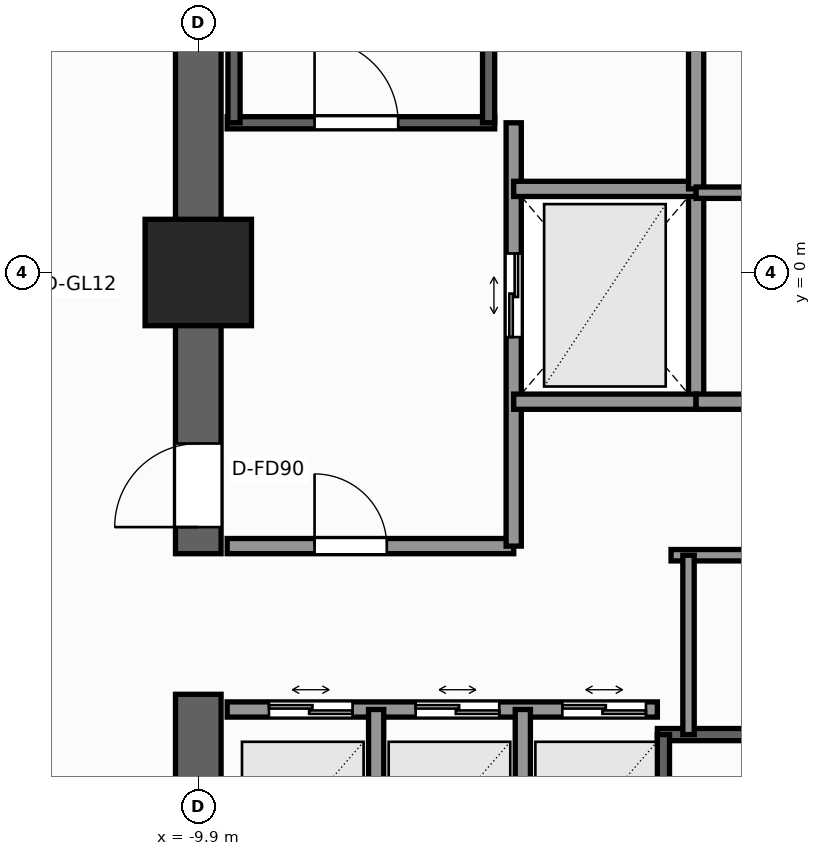
"""IFC4 building model, lengths in metres.
Left out: names, types, materials, properties, quantities, classifications, styles, units other than length and angle.
Written with IfcOpenShell. Run it as: python <this file> out.ifc"""

import sys

from ifc_helpers import new_model, si_unit, direction, frame, frame_2d, origin, origin_2d, place, context, subcontext, project, spatial, rectangle, extrude, element, fill, save


model = new_model("IFC4")
c1 = context("Model", 3, precision=1e-05, world=origin(), true_north=direction((0.0, 1.0)))
c2 = subcontext(c1, "Body", "Model", "MODEL_VIEW")
j1 = project(units=[si_unit("LENGTHUNIT", "METRE"), si_unit("PLANEANGLEUNIT", "RADIAN")], contexts=[c1])
p1 = place(None, origin())
s1 = spatial("IfcSite", under=j1, at=p1, CompositionType="ELEMENT")
p2 = place(p1, origin())
s2 = spatial("IfcBuilding", under=s1, at=p2, CompositionType="ELEMENT")
p3 = place(p2, frame((0.0, 0.0, 68.0)))
s3 = spatial("IfcBuildingStorey", under=s2, at=p3, CompositionType="ELEMENT", Elevation=68.0)
p4 = place(p3, frame((-9.9, -9.6, 0.0), z_axis=(0.0, 0.0, 1.0), x_axis=(0.0, 1.0, 0.0)))
e1 = element("IfcWall", 1, at=p4, inside=s3, PredefinedType="SHEAR", context=c2, shape_type="SweptSolid", body=[
    extrude(rectangle(XDim=4.05, YDim=0.6, at=frame_2d((2.025, 0.0))), origin(), (0.0, 0.0, 1.0), 4.2),
])
p5 = place(p3, frame((-9.9, -3.7, 0.0), z_axis=(0.0, 0.0, 1.0), x_axis=(0.0, 1.0, 0.0)))
e2 = element("IfcWall", 2, at=p5, inside=s3, PredefinedType="SHEAR", context=c2, shape_type="SweptSolid", body=[
    extrude(rectangle(XDim=13.3, YDim=0.6, at=frame_2d((6.65, 0.0))), origin(), (0.0, 0.0, 1.0), 4.2),
])
p6 = place(p5, frame((0.35, 0.0, 0.0)))
e3 = element("IfcOpeningElement", 3, at=p6, cuts=e2, PredefinedType="OPENING", context=c2, shape_type="SweptSolid", body=[
    extrude(rectangle(XDim=1.1, YDim=2.2, at=frame_2d((0.55, 1.1))), frame((0.0, 0.31, 0.0), z_axis=(0.0, -1.0, 0.0), x_axis=(1.0, 0.0, 0.0)), (0.0, 0.0, 1.0), 0.62),
])
p7 = place(p3, frame((-9.9, 0.0, 0.0), z_axis=(0.0, 0.0, 1.0), x_axis=(1.0, 0.0, 0.0)))
e4 = element("IfcColumn", 4, at=p7, inside=s3, PredefinedType="COLUMN", context=c2, shape_type="SweptSolid", body=[
    extrude(rectangle(XDim=1.4, YDim=1.4, at=origin_2d()), origin(), (0.0, 0.0, 1.0), 4.2),
])
p8 = place(p3, frame((-9.52, 1.97, 0.0), z_axis=(0.0, 0.0, 1.0), x_axis=(1.0, 0.0, 0.0)))
e5 = element("IfcWall", 5, at=p8, inside=s3, PredefinedType="SHEAR", context=c2, shape_type="SweptSolid", body=[
    extrude(rectangle(XDim=3.52, YDim=0.16, at=frame_2d((1.76, 0.0))), origin(), (0.0, 0.0, 1.0), 4.2),
])
p9 = place(p8, frame((1.15, 0.0, 0.0)))
e6 = element("IfcOpeningElement", 6, at=p9, cuts=e5, PredefinedType="OPENING", context=c2, shape_type="SweptSolid", body=[
    extrude(rectangle(XDim=1.1, YDim=2.2, at=frame_2d((0.55, 1.1))), frame((0.0, 0.09, 0.0), z_axis=(0.0, -1.0, 0.0), x_axis=(1.0, 0.0, 0.0)), (0.0, 0.0, 1.0), 0.18),
])
for number, where, z_axis, x_axis in (
    (7, (-9.43, 1.97, 0.0), (0.0, 0.0, 1.0), (0.0, 1.0, 0.0)),
    (8, (-6.08, 1.97, 0.0), (0.0, 0.0, 1.0), (0.0, 1.0, 0.0)),
):
    element("IfcWall", number, at=place(p3, frame(where, z_axis=z_axis, x_axis=x_axis)), inside=s3, PredefinedType="SHEAR", context=c2, shape_type="SweptSolid", body=[
        extrude(rectangle(XDim=7.56, YDim=0.16, at=frame_2d((3.78, 0.0))), origin(), (0.0, 0.0, 1.0), 4.2),
    ])
p10 = place(p3, frame((-3.86, -6.08, 0.0), z_axis=(0.0, 0.0, 1.0), x_axis=(1.0, 0.0, 0.0)))
e9 = element("IfcWall", 9, at=p10, inside=s3, PredefinedType="SHEAR", context=c2, shape_type="SweptSolid", body=[
    extrude(rectangle(XDim=7.72, YDim=0.16, at=frame_2d((3.86, 0.0))), origin(), (0.0, 0.0, 1.0), 4.2),
])
p11 = place(p3, frame((-3.78, -9.43, 0.0), z_axis=(0.0, 0.0, 1.0), x_axis=(0.0, 1.0, 0.0)))
e10 = element("IfcWall", 10, at=p11, inside=s3, PredefinedType="SHEAR", context=c2, shape_type="SweptSolid", body=[
    extrude(rectangle(XDim=3.35, YDim=0.16, at=frame_2d((1.675, 0.0))), origin(), (0.0, 0.0, 1.0), 4.2),
])
p12 = place(p3, frame((-9.52, -3.6, 0.0), z_axis=(0.0, 0.0, 1.0), x_axis=(1.0, 0.0, 0.0)))
e11 = element("IfcWall", 11, at=p12, inside=s3, PredefinedType="SOLIDWALL", context=c2, shape_type="SweptSolid", body=[
    extrude(rectangle(XDim=3.77, YDim=0.2, at=frame_2d((1.885, 0.0))), origin(), (0.0, 0.0, 1.0), 3.98),
])
p13 = place(p12, frame((1.15, 0.0, 0.0)))
e12 = element("IfcOpeningElement", 12, at=p13, cuts=e11, PredefinedType="OPENING", context=c2, shape_type="SweptSolid", body=[
    extrude(rectangle(XDim=0.95, YDim=2.06, at=frame_2d((0.475, 1.03))), frame((0.0, 0.11, 0.0), z_axis=(0.0, -1.0, 0.0), x_axis=(1.0, 0.0, 0.0)), (0.0, 0.0, 1.0), 0.22),
])
p14 = place(p3, frame((-5.75, -3.6, 0.0), z_axis=(0.0, 0.0, 1.0), x_axis=(0.0, 1.0, 0.0)))
e13 = element("IfcWall", 13, at=p14, inside=s3, PredefinedType="SOLIDWALL", context=c2, shape_type="SweptSolid", body=[
    extrude(rectangle(XDim=5.57, YDim=0.2, at=frame_2d((2.785, 0.0))), origin(), (0.0, 0.0, 1.0), 3.98),
])
p15 = place(p14, frame((2.75, 0.0, 0.0)))
e14 = element("IfcOpeningElement", 14, at=p15, cuts=e13, PredefinedType="OPENING", context=c2, shape_type="SweptSolid", body=[
    extrude(rectangle(XDim=1.1, YDim=2.2, at=frame_2d((0.55, 1.1))), frame((0.0, 0.11, 0.0), z_axis=(0.0, -1.0, 0.0), x_axis=(1.0, 0.0, 0.0)), (0.0, 0.0, 1.0), 0.22),
])
p16 = place(p3, frame((-3.35, -1.7, 0.0), z_axis=(0.0, 0.0, 1.0), x_axis=(0.0, 1.0, 0.0)))
e15 = element("IfcWall", 15, at=p16, inside=s3, PredefinedType="SOLIDWALL", context=c2, shape_type="SweptSolid", body=[
    extrude(rectangle(XDim=2.8, YDim=0.2, at=frame_2d((1.4, 0.0))), origin(), (0.0, 0.0, 1.0), 3.98),
])
for number, where, z_axis, x_axis in (
    (16, (-5.75, -1.7, 0.0), (0.0, 0.0, 1.0), (1.0, 0.0, 0.0)),
    (17, (-5.75, 1.1, 0.0), (0.0, 0.0, 1.0), (1.0, 0.0, 0.0)),
):
    element("IfcWall", number, at=place(p3, frame(where, z_axis=z_axis, x_axis=x_axis)), inside=s3, PredefinedType="SOLIDWALL", context=c2, shape_type="SweptSolid", body=[
        extrude(rectangle(XDim=2.4, YDim=0.2, at=frame_2d((1.2, 0.0))), origin(), (0.0, 0.0, 1.0), 3.98),
    ])
p17 = place(p3, frame((-9.52, -5.75, 0.0), z_axis=(0.0, 0.0, 1.0), x_axis=(1.0, 0.0, 0.0)))
e18 = element("IfcWall", 18, at=p17, inside=s3, PredefinedType="SOLIDWALL", context=c2, shape_type="SweptSolid", body=[
    extrude(rectangle(XDim=5.66, YDim=0.2, at=frame_2d((2.83, 0.0))), origin(), (0.0, 0.0, 1.0), 3.98),
])
p18 = place(p17, frame((0.55, 0.0, 0.0)))
e19 = element("IfcOpeningElement", 19, at=p18, cuts=e18, PredefinedType="OPENING", context=c2, shape_type="SweptSolid", body=[
    extrude(rectangle(XDim=1.1, YDim=2.2, at=frame_2d((0.55, 1.1))), frame((0.0, 0.11, 0.0), z_axis=(0.0, -1.0, 0.0), x_axis=(1.0, 0.0, 0.0)), (0.0, 0.0, 1.0), 0.22),
])
p19 = place(p17, frame((2.48, 0.0, 0.0)))
e20 = element("IfcOpeningElement", 20, at=p19, cuts=e18, PredefinedType="OPENING", context=c2, shape_type="SweptSolid", body=[
    extrude(rectangle(XDim=1.1, YDim=2.2, at=frame_2d((0.55, 1.1))), frame((0.0, 0.11, 0.0), z_axis=(0.0, -1.0, 0.0), x_axis=(1.0, 0.0, 0.0)), (0.0, 0.0, 1.0), 0.22),
])
p20 = place(p17, frame((4.41, 0.0, 0.0)))
e21 = element("IfcOpeningElement", 21, at=p20, cuts=e18, PredefinedType="OPENING", context=c2, shape_type="SweptSolid", body=[
    extrude(rectangle(XDim=1.1, YDim=2.2, at=frame_2d((0.55, 1.1))), frame((0.0, 0.11, 0.0), z_axis=(0.0, -1.0, 0.0), x_axis=(1.0, 0.0, 0.0)), (0.0, 0.0, 1.0), 0.22),
])
for number, where, z_axis, x_axis in (
    (22, (-7.56, -9.52, 0.0), (0.0, 0.0, 1.0), (0.0, 1.0, 0.0)),
    (23, (-5.63, -9.52, 0.0), (0.0, 0.0, 1.0), (0.0, 1.0, 0.0)),
):
    element("IfcWall", number, at=place(p3, frame(where, z_axis=z_axis, x_axis=x_axis)), inside=s3, PredefinedType="SOLIDWALL", context=c2, shape_type="SweptSolid", body=[
        extrude(rectangle(XDim=3.77, YDim=0.2, at=frame_2d((1.885, 0.0))), origin(), (0.0, 0.0, 1.0), 3.98),
    ])
p21 = place(p3, frame((-3.35, -1.7, 0.0), z_axis=(0.0, 0.0, 1.0), x_axis=(1.0, 0.0, 0.0)))
e24 = element("IfcWall", 24, at=p21, inside=s3, PredefinedType="SOLIDWALL", context=c2, shape_type="SweptSolid", body=[
    extrude(rectangle(XDim=6.7, YDim=0.2, at=frame_2d((3.35, 0.0))), origin(), (0.0, 0.0, 1.0), 3.98),
])
p22 = place(p3, frame((-3.35, 1.1, 0.0), z_axis=(0.0, 0.0, 1.0), x_axis=(0.0, 1.0, 0.0)))
e25 = element("IfcWall", 25, at=p22, inside=s3, PredefinedType="SOLIDWALL", context=c2, shape_type="SweptSolid", body=[
    extrude(rectangle(XDim=3.2, YDim=0.2, at=frame_2d((1.6, 0.0))), origin(), (0.0, 0.0, 1.0), 3.98),
])
p23 = place(p3, frame((-3.35, 1.05, 0.0), z_axis=(0.0, 0.0, 1.0), x_axis=(1.0, 0.0, 0.0)))
e26 = element("IfcWall", 26, at=p23, inside=s3, PredefinedType="PARTITIONING", context=c2, shape_type="SweptSolid", body=[
    extrude(rectangle(XDim=6.7, YDim=0.15, at=frame_2d((3.35, 0.0))), origin(), (0.0, 0.0, 1.0), 3.98),
])
p24 = place(p23, frame((4.2, 0.0, 0.0)))
e27 = element("IfcOpeningElement", 27, at=p24, cuts=e26, PredefinedType="OPENING", context=c2, shape_type="SweptSolid", body=[
    extrude(rectangle(XDim=0.85, YDim=2.03, at=frame_2d((0.425, 1.015))), frame((0.0, 0.085, 0.0), z_axis=(0.0, -1.0, 0.0), x_axis=(1.0, 0.0, 0.0)), (0.0, 0.0, 1.0), 0.17),
])
p25 = place(p3, frame((-3.68, -3.72, 0.0), z_axis=(0.0, 0.0, 1.0), x_axis=(1.0, 0.0, 0.0)))
e28 = element("IfcWall", 28, at=p25, inside=s3, PredefinedType="PARTITIONING", context=c2, shape_type="SweptSolid", body=[
    extrude(rectangle(XDim=7.36, YDim=0.15, at=frame_2d((3.68, 0.0))), origin(), (0.0, 0.0, 1.0), 3.98),
])
p26 = place(p3, frame((-3.45, -6.08, 0.0), z_axis=(0.0, 0.0, 1.0), x_axis=(0.0, 1.0, 0.0)))
e29 = element("IfcWall", 29, at=p26, inside=s3, PredefinedType="PARTITIONING", context=c2, shape_type="SweptSolid", body=[
    extrude(rectangle(XDim=2.36, YDim=0.15, at=frame_2d((1.18, 0.0))), origin(), (0.0, 0.0, 1.0), 3.98),
])
p27 = place(p9, origin())
e30 = element("IfcDoor", 30, at=p27, inside=s3, OperationType="SINGLE_SWING_LEFT", PredefinedType="DOOR", context=c2, shape_type="SweptSolid", body=[
    extrude(rectangle(XDim=1.1, YDim=2.2, at=frame_2d((0.55, 1.1))), frame((0.0, 0.025, 0.0), z_axis=(0.0, -1.0, 0.0), x_axis=(1.0, 0.0, 0.0)), (0.0, 0.0, 1.0), 0.05),
])
fill(e6, e30)
p28 = place(p6, origin())
e31 = element("IfcDoor", 31, at=p28, inside=s3, OperationType="SINGLE_SWING_LEFT", PredefinedType="DOOR", context=c2, shape_type="SweptSolid", body=[
    extrude(rectangle(XDim=1.1, YDim=2.2, at=frame_2d((0.55, 1.1))), frame((0.0, 0.025, 0.0), z_axis=(0.0, -1.0, 0.0), x_axis=(1.0, 0.0, 0.0)), (0.0, 0.0, 1.0), 0.05),
])
fill(e3, e31)
p29 = place(p15, origin())
e32 = element("IfcDoor", 32, at=p29, inside=s3, OperationType="DOUBLE_DOOR_SLIDING", PredefinedType="DOOR", context=c2, shape_type="SweptSolid", body=[
    extrude(rectangle(XDim=1.1, YDim=2.2, at=frame_2d((0.55, 1.1))), frame((0.0, 0.025, 0.0), z_axis=(0.0, -1.0, 0.0), x_axis=(1.0, 0.0, 0.0)), (0.0, 0.0, 1.0), 0.05),
])
fill(e14, e32)
p30 = place(p18, origin())
e33 = element("IfcDoor", 33, at=p30, inside=s3, OperationType="DOUBLE_DOOR_SLIDING", PredefinedType="DOOR", context=c2, shape_type="SweptSolid", body=[
    extrude(rectangle(XDim=1.1, YDim=2.2, at=frame_2d((0.55, 1.1))), frame((0.0, 0.025, 0.0), z_axis=(0.0, -1.0, 0.0), x_axis=(1.0, 0.0, 0.0)), (0.0, 0.0, 1.0), 0.05),
])
fill(e19, e33)
p31 = place(p19, origin())
e34 = element("IfcDoor", 34, at=p31, inside=s3, OperationType="DOUBLE_DOOR_SLIDING", PredefinedType="DOOR", context=c2, shape_type="SweptSolid", body=[
    extrude(rectangle(XDim=1.1, YDim=2.2, at=frame_2d((0.55, 1.1))), frame((0.0, 0.025, 0.0), z_axis=(0.0, -1.0, 0.0), x_axis=(1.0, 0.0, 0.0)), (0.0, 0.0, 1.0), 0.05),
])
fill(e20, e34)
p32 = place(p20, origin())
e35 = element("IfcDoor", 35, at=p32, inside=s3, OperationType="DOUBLE_DOOR_SLIDING", PredefinedType="DOOR", context=c2, shape_type="SweptSolid", body=[
    extrude(rectangle(XDim=1.1, YDim=2.2, at=frame_2d((0.55, 1.1))), frame((0.0, 0.025, 0.0), z_axis=(0.0, -1.0, 0.0), x_axis=(1.0, 0.0, 0.0)), (0.0, 0.0, 1.0), 0.05),
])
fill(e21, e35)
p33 = place(p13, origin())
e36 = element("IfcDoor", 36, at=p33, inside=s3, OperationType="SINGLE_SWING_LEFT", PredefinedType="DOOR", context=c2, shape_type="SweptSolid", body=[
    extrude(rectangle(XDim=0.95, YDim=2.06, at=frame_2d((0.475, 1.03))), frame((0.0, 0.025, 0.0), z_axis=(0.0, -1.0, 0.0), x_axis=(1.0, 0.0, 0.0)), (0.0, 0.0, 1.0), 0.05),
])
fill(e12, e36)
save(model, sys.argv[1])
